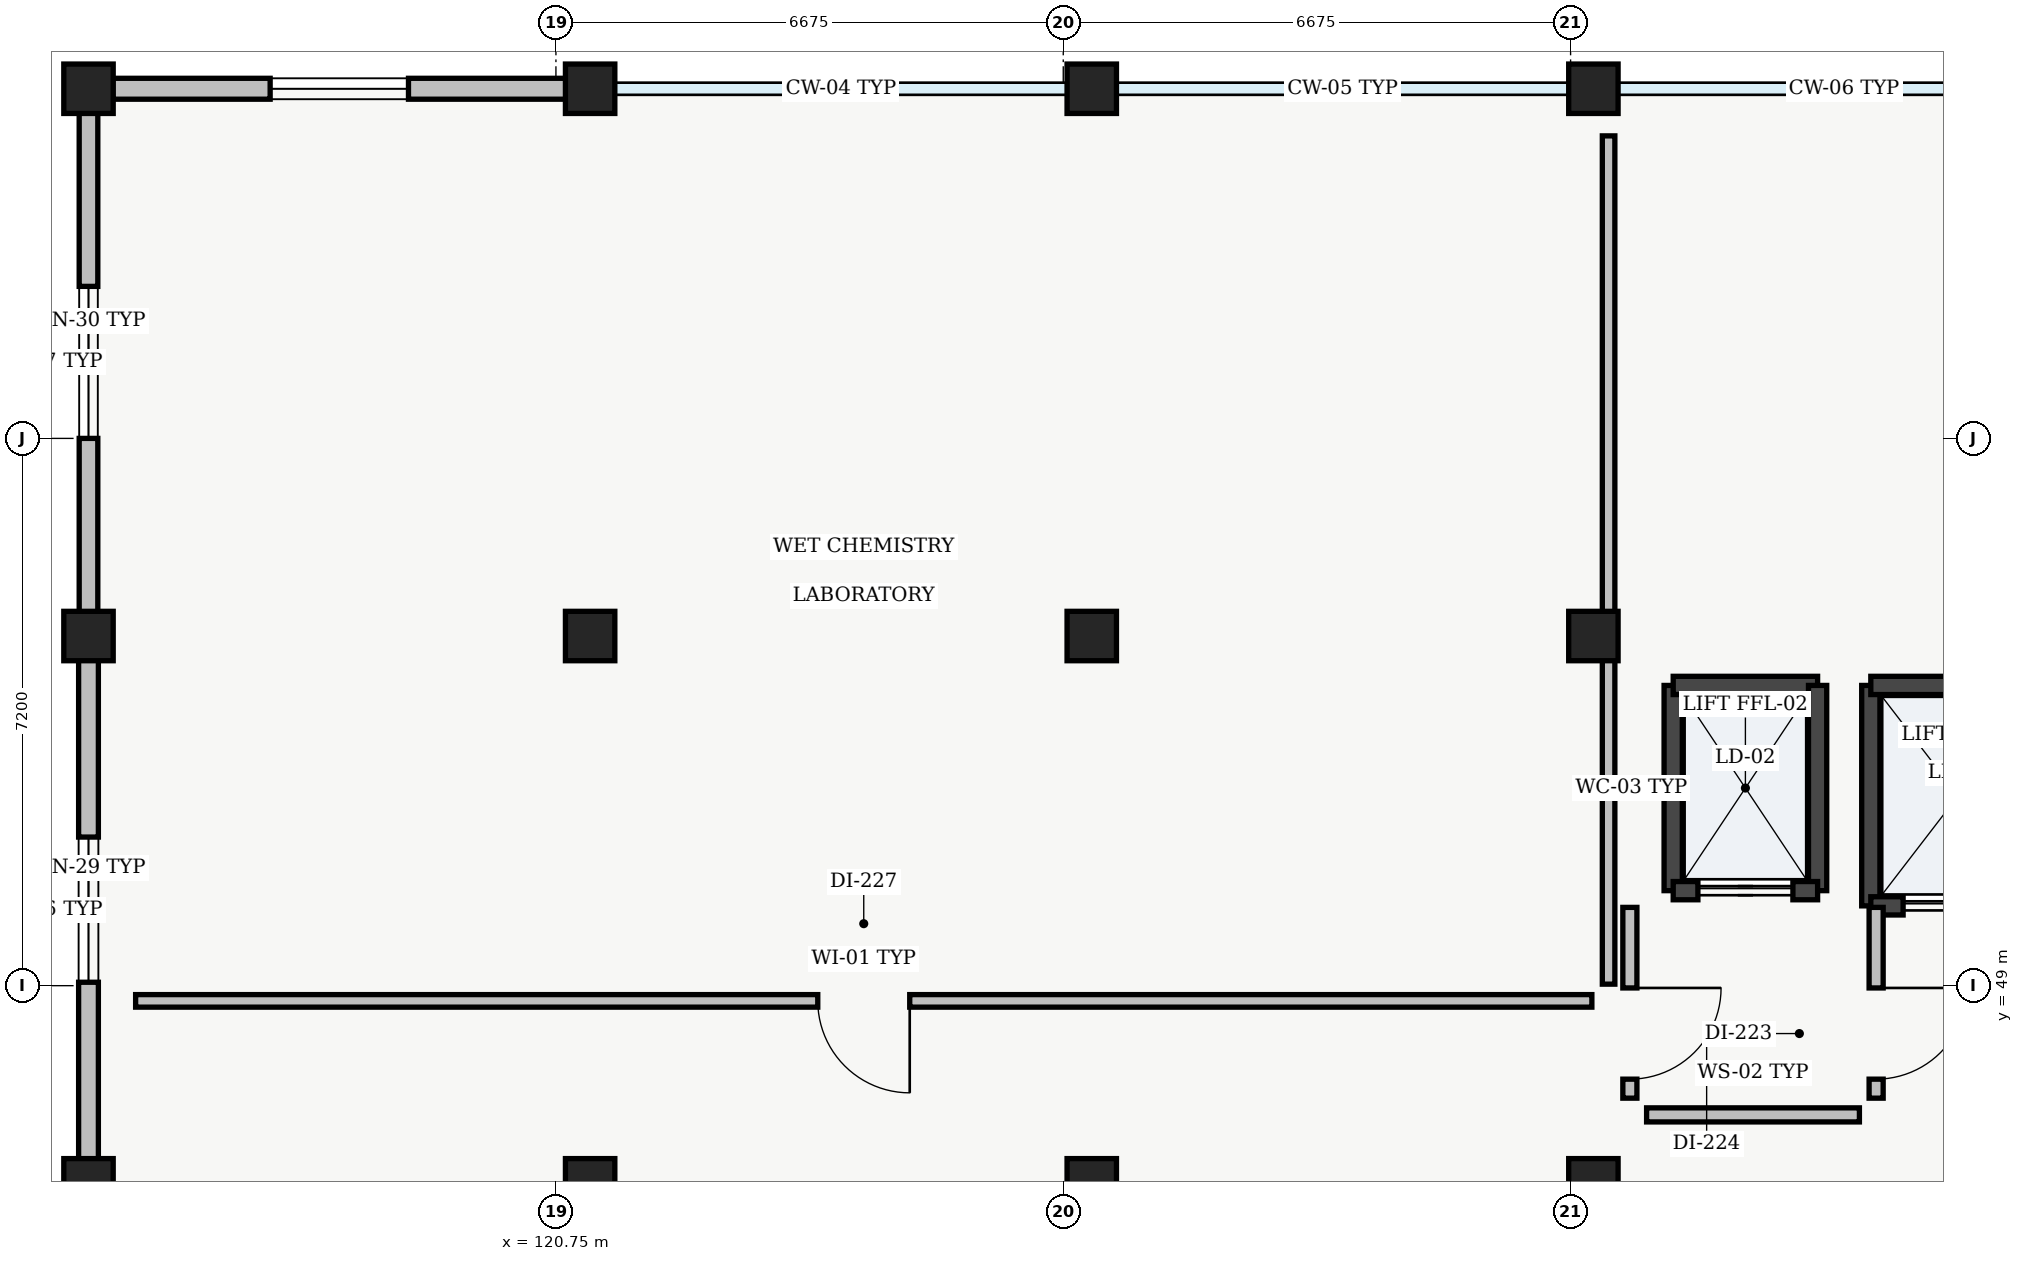
"""IFC4 building model, lengths in metres.
Left out: names, types, materials, properties, quantities, classifications, styles, units other than length and angle.
Written with IfcOpenShell. Run it as: python <this file> out.ifc"""

import sys

from ifc_helpers import new_model, si_unit, direction, frame, frame_2d, origin, origin_2d, place, context, subcontext, project, spatial, rectangle, extrude, element, fill, save


model = new_model("IFC4")
c1 = context("Model", 3, precision=1e-05, world=origin(), true_north=direction((0.0, 1.0)))
c2 = subcontext(c1, "Body", "Model", "MODEL_VIEW")
j1 = project(units=[si_unit("LENGTHUNIT", "METRE"), si_unit("PLANEANGLEUNIT", "RADIAN")], contexts=[c1])
p1 = place(None, origin())
s1 = spatial("IfcSite", under=j1, at=p1, CompositionType="ELEMENT")
p2 = place(p1, origin())
s2 = spatial("IfcBuilding", under=s1, at=p2, CompositionType="ELEMENT")
p3 = place(p2, frame((0.0, 0.0, 18.6)))
s3 = spatial("IfcBuildingStorey", under=s2, at=p3, CompositionType="ELEMENT", Elevation=18.6)
for number, where, z_axis, x_axis in (
    (1, (114.6, 46.4, 0.0), (0.0, 0.0, 1.0), (1.0, 0.0, 0.0)),
    (2, (114.6, 53.6, 0.0), (0.0, 0.0, 1.0), (1.0, 0.0, 0.0)),
    (3, (114.6, 60.8, 0.0), (0.0, 0.0, 1.0), (1.0, 0.0, 0.0)),
    (4, (121.2, 46.4, 0.0), (0.0, 0.0, 1.0), (1.0, 0.0, 0.0)),
    (5, (121.2, 53.6, 0.0), (0.0, 0.0, 1.0), (1.0, 0.0, 0.0)),
    (6, (121.2, 60.8, 0.0), (0.0, 0.0, 1.0), (1.0, 0.0, 0.0)),
    (7, (127.8, 46.4, 0.0), (0.0, 0.0, 1.0), (1.0, 0.0, 0.0)),
    (8, (127.8, 53.6, 0.0), (0.0, 0.0, 1.0), (1.0, 0.0, 0.0)),
    (9, (127.8, 60.8, 0.0), (0.0, 0.0, 1.0), (1.0, 0.0, 0.0)),
    (10, (134.4, 46.4, 0.0), (0.0, 0.0, 1.0), (1.0, 0.0, 0.0)),
    (11, (134.4, 53.6, 0.0), (0.0, 0.0, 1.0), (1.0, 0.0, 0.0)),
    (12, (134.4, 60.8, 0.0), (0.0, 0.0, 1.0), (1.0, 0.0, 0.0)),
):
    element("IfcColumn", number, at=place(p3, frame(where, z_axis=z_axis, x_axis=x_axis)), inside=s3, PredefinedType="COLUMN", context=c2, shape_type="SweptSolid", body=[
        extrude(rectangle(XDim=0.65, YDim=0.65, at=origin_2d()), origin(), (0.0, 0.0, 1.0), 4.3),
    ])
p4 = place(p3, frame((114.6, 46.72, 0.0), z_axis=(0.0, 0.0, 1.0), x_axis=(0.0, 1.0, 0.0)))
e13 = element("IfcWall", 13, at=p4, inside=s3, PredefinedType="STANDARD", context=c2, shape_type="SweptSolid", body=[
    extrude(rectangle(XDim=6.56, YDim=0.26, at=frame_2d((3.28, 0.0))), origin(), (0.0, 0.0, 1.0), 3.835),
])
p5 = place(p4, frame((2.325, 0.0, 0.95)))
e14 = element("IfcOpeningElement", 14, at=p5, cuts=e13, PredefinedType="OPENING", context=c2, shape_type="SweptSolid", body=[
    extrude(rectangle(XDim=1.91, YDim=1.4, at=frame_2d((0.955, 0.7))), frame((0.0, 0.13, 0.0), z_axis=(0.0, -1.0, 0.0), x_axis=(1.0, 0.0, 0.0)), (0.0, 0.0, 1.0), 0.26),
])
p6 = place(p3, frame((114.6, 53.92, 0.0), z_axis=(0.0, 0.0, 1.0), x_axis=(0.0, 1.0, 0.0)))
e15 = element("IfcWall", 15, at=p6, inside=s3, PredefinedType="STANDARD", context=c2, shape_type="SweptSolid", body=[
    extrude(rectangle(XDim=6.56, YDim=0.245, at=frame_2d((3.28, 0.0))), origin(), (0.0, 0.0, 1.0), 3.835),
])
p7 = place(p6, frame((2.28, 0.0, 0.95)))
e16 = element("IfcOpeningElement", 16, at=p7, cuts=e15, PredefinedType="OPENING", context=c2, shape_type="SweptSolid", body=[
    extrude(rectangle(XDim=2.0, YDim=1.42, at=frame_2d((1.0, 0.71))), frame((0.0, 0.123, 0.0), z_axis=(0.0, -1.0, 0.0), x_axis=(1.0, 0.0, 0.0)), (0.0, 0.0, 1.0), 0.245),
])
p8 = place(p3, frame((114.92, 60.8, 0.0), z_axis=(0.0, 0.0, 1.0), x_axis=(1.0, 0.0, 0.0)))
e17 = element("IfcWall", 17, at=p8, inside=s3, PredefinedType="STANDARD", context=c2, shape_type="SweptSolid", body=[
    extrude(rectangle(XDim=5.96, YDim=0.275, at=frame_2d((2.98, 0.0))), origin(), (0.0, 0.0, 1.0), 3.835),
])
p9 = place(p8, frame((2.07, 0.0, 0.95)))
e18 = element("IfcOpeningElement", 18, at=p9, cuts=e17, PredefinedType="OPENING", context=c2, shape_type="SweptSolid", body=[
    extrude(rectangle(XDim=1.82, YDim=1.38, at=frame_2d((0.91, 0.69))), frame((0.0, 0.137, 0.0), z_axis=(0.0, -1.0, 0.0), x_axis=(1.0, 0.0, 0.0)), (0.0, 0.0, 1.0), 0.275),
])
p10 = place(p3, frame((135.45, 50.25, 0.0), z_axis=(0.0, 0.0, 1.0), x_axis=(0.0, 1.0, 0.0)))
e19 = element("IfcWall", 19, at=p10, inside=s3, PredefinedType="SHEAR", context=c2, shape_type="SweptSolid", body=[
    extrude(rectangle(XDim=2.7, YDim=0.24, at=frame_2d((1.35, 0.0))), origin(), (0.0, 0.0, 1.0), 4.28),
])
p11 = place(p3, frame((135.45, 52.95, 0.0), z_axis=(0.0, 0.0, 1.0), x_axis=(1.0, 0.0, 0.0)))
e20 = element("IfcWall", 20, at=p11, inside=s3, PredefinedType="SHEAR", context=c2, shape_type="SweptSolid", body=[
    extrude(rectangle(XDim=1.9, YDim=0.24, at=frame_2d((0.95, 0.0))), origin(), (0.0, 0.0, 1.0), 4.28),
])
p12 = place(p3, frame((137.35, 52.95, 0.0), z_axis=(0.0, 0.0, 1.0), x_axis=(0.0, -1.0, 0.0)))
e21 = element("IfcWall", 21, at=p12, inside=s3, PredefinedType="SHEAR", context=c2, shape_type="SweptSolid", body=[
    extrude(rectangle(XDim=2.7, YDim=0.24, at=frame_2d((1.35, 0.0))), origin(), (0.0, 0.0, 1.0), 4.28),
])
p13 = place(p3, frame((137.35, 50.25, 0.0), z_axis=(0.0, 0.0, 1.0), x_axis=(-1.0, 0.0, 0.0)))
e22 = element("IfcWall", 22, at=p13, inside=s3, PredefinedType="SHEAR", context=c2, shape_type="SweptSolid", body=[
    extrude(rectangle(XDim=1.9, YDim=0.24, at=frame_2d((0.95, 0.0))), origin(), (0.0, 0.0, 1.0), 4.28),
])
p14 = place(p13, frame((0.325, 0.0, 0.0)))
e23 = element("IfcOpeningElement", 23, at=p14, cuts=e22, PredefinedType="OPENING", context=c2, shape_type="SweptSolid", body=[
    extrude(rectangle(XDim=1.25, YDim=2.2, at=frame_2d((0.625, 1.1))), frame((0.0, 0.12, 0.0), z_axis=(0.0, -1.0, 0.0), x_axis=(1.0, 0.0, 0.0)), (0.0, 0.0, 1.0), 0.24),
])
p15 = place(p3, frame((138.05, 50.05, 0.0), z_axis=(0.0, 0.0, 1.0), x_axis=(0.0, 1.0, 0.0)))
e24 = element("IfcWall", 24, at=p15, inside=s3, PredefinedType="SHEAR", context=c2, shape_type="SweptSolid", body=[
    extrude(rectangle(XDim=2.9, YDim=0.24, at=frame_2d((1.45, 0.0))), origin(), (0.0, 0.0, 1.0), 4.28),
])
p16 = place(p3, frame((138.05, 52.95, 0.0), z_axis=(0.0, 0.0, 1.0), x_axis=(1.0, 0.0, 0.0)))
e25 = element("IfcWall", 25, at=p16, inside=s3, PredefinedType="SHEAR", context=c2, shape_type="SweptSolid", body=[
    extrude(rectangle(XDim=2.3, YDim=0.24, at=frame_2d((1.15, 0.0))), origin(), (0.0, 0.0, 1.0), 4.28),
])
p17 = place(p3, frame((140.35, 50.05, 0.0), z_axis=(0.0, 0.0, 1.0), x_axis=(-1.0, 0.0, 0.0)))
e26 = element("IfcWall", 26, at=p17, inside=s3, PredefinedType="SHEAR", context=c2, shape_type="SweptSolid", body=[
    extrude(rectangle(XDim=2.3, YDim=0.24, at=frame_2d((1.15, 0.0))), origin(), (0.0, 0.0, 1.0), 4.28),
])
p18 = place(p17, frame((0.425, 0.0, 0.0)))
e27 = element("IfcOpeningElement", 27, at=p18, cuts=e26, PredefinedType="OPENING", context=c2, shape_type="SweptSolid", body=[
    extrude(rectangle(XDim=1.45, YDim=2.3, at=frame_2d((0.725, 1.15))), frame((0.0, 0.12, 0.0), z_axis=(0.0, -1.0, 0.0), x_axis=(1.0, 0.0, 0.0)), (0.0, 0.0, 1.0), 0.24),
])
p19 = place(p3, frame((135.1, 47.3, 0.0), z_axis=(0.0, 0.0, 1.0), x_axis=(1.0, 0.0, 0.0)))
e28 = element("IfcWall", 28, at=p19, inside=s3, PredefinedType="SOLIDWALL", context=c2, shape_type="SweptSolid", body=[
    extrude(rectangle(XDim=2.8, YDim=0.185, at=frame_2d((1.4, 0.0))), origin(), (0.0, 0.0, 1.0), 3.95),
])
p20 = place(p3, frame((138.12, 47.52, 0.0), z_axis=(0.0, 0.0, 1.0), x_axis=(0.0, 1.0, 0.0)))
e29 = element("IfcWall", 29, at=p20, inside=s3, PredefinedType="SOLIDWALL", context=c2, shape_type="SweptSolid", body=[
    extrude(rectangle(XDim=2.51, YDim=0.185, at=frame_2d((1.255, 0.0))), origin(), (0.0, 0.0, 1.0), 3.95),
])
p21 = place(p20, frame((0.25, 0.0, 0.0)))
e30 = element("IfcOpeningElement", 30, at=p21, cuts=e29, PredefinedType="OPENING", context=c2, shape_type="SweptSolid", body=[
    extrude(rectangle(XDim=1.2, YDim=2.15, at=frame_2d((0.6, 1.075))), frame((0.0, 0.093, 0.0), z_axis=(0.0, -1.0, 0.0), x_axis=(1.0, 0.0, 0.0)), (0.0, 0.0, 1.0), 0.185),
])
p22 = place(p3, frame((134.88, 50.03, 0.0), z_axis=(0.0, 0.0, 1.0), x_axis=(0.0, -1.0, 0.0)))
e31 = element("IfcWall", 31, at=p22, inside=s3, PredefinedType="SOLIDWALL", context=c2, shape_type="SweptSolid", body=[
    extrude(rectangle(XDim=2.51, YDim=0.185, at=frame_2d((1.255, 0.0))), origin(), (0.0, 0.0, 1.0), 3.95),
])
p23 = place(p22, frame((1.06, 0.0, 0.0)))
e32 = element("IfcOpeningElement", 32, at=p23, cuts=e31, PredefinedType="OPENING", context=c2, shape_type="SweptSolid", body=[
    extrude(rectangle(XDim=1.2, YDim=2.15, at=frame_2d((0.6, 1.075))), frame((0.0, 0.093, 0.0), z_axis=(0.0, -1.0, 0.0), x_axis=(1.0, 0.0, 0.0)), (0.0, 0.0, 1.0), 0.185),
])
p24 = place(p3, frame((115.22, 48.8, 0.0), z_axis=(0.0, 0.0, 1.0), x_axis=(1.0, 0.0, 0.0)))
e33 = element("IfcWall", 33, at=p24, inside=s3, PredefinedType="PARTITIONING", context=c2, shape_type="SweptSolid", body=[
    extrude(rectangle(XDim=19.16, YDim=0.165, at=frame_2d((9.58, 0.0))), origin(), (0.0, 0.0, 1.0), 3.885),
])
p25 = place(p24, frame((8.975, 0.0, 0.0)))
e34 = element("IfcOpeningElement", 34, at=p25, cuts=e33, PredefinedType="OPENING", context=c2, shape_type="SweptSolid", body=[
    extrude(rectangle(XDim=1.21, YDim=2.16, at=frame_2d((0.605, 1.08))), frame((0.0, 0.083, 0.0), z_axis=(0.0, -1.0, 0.0), x_axis=(1.0, 0.0, 0.0)), (0.0, 0.0, 1.0), 0.165),
])
p26 = place(p3, frame((134.6, 49.02, 0.0), z_axis=(0.0, 0.0, 1.0), x_axis=(0.0, 1.0, 0.0)))
e35 = element("IfcWall", 35, at=p26, inside=s3, PredefinedType="PARTITIONING", context=c2, shape_type="SweptSolid", body=[
    extrude(rectangle(XDim=11.16, YDim=0.165, at=frame_2d((5.58, 0.0))), origin(), (0.0, 0.0, 1.0), 3.685),
])
p27 = place(p5, origin())
e36 = element("IfcWindow", 36, at=p27, inside=s3, PartitioningType="SINGLE_PANEL", PredefinedType="WINDOW", context=c2, shape_type="SweptSolid", body=[
    extrude(rectangle(XDim=1.91, YDim=1.4, at=frame_2d((0.955, 0.7))), frame((0.0, 0.03, 0.0), z_axis=(0.0, -1.0, 0.0), x_axis=(1.0, 0.0, 0.0)), (0.0, 0.0, 1.0), 0.06),
])
fill(e14, e36)
p28 = place(p7, origin())
e37 = element("IfcWindow", 37, at=p28, inside=s3, PartitioningType="SINGLE_PANEL", PredefinedType="WINDOW", context=c2, shape_type="SweptSolid", body=[
    extrude(rectangle(XDim=2.0, YDim=1.42, at=frame_2d((1.0, 0.71))), frame((0.0, 0.03, 0.0), z_axis=(0.0, -1.0, 0.0), x_axis=(1.0, 0.0, 0.0)), (0.0, 0.0, 1.0), 0.06),
])
fill(e16, e37)
p29 = place(p9, origin())
e38 = element("IfcWindow", 38, at=p29, inside=s3, PartitioningType="SINGLE_PANEL", PredefinedType="WINDOW", context=c2, shape_type="SweptSolid", body=[
    extrude(rectangle(XDim=1.82, YDim=1.38, at=frame_2d((0.91, 0.69))), frame((0.0, 0.03, 0.0), z_axis=(0.0, -1.0, 0.0), x_axis=(1.0, 0.0, 0.0)), (0.0, 0.0, 1.0), 0.06),
])
fill(e18, e38)
p30 = place(p14, origin())
e39 = element("IfcDoor", 39, at=p30, inside=s3, OperationType="SLIDING_TO_RIGHT", PredefinedType="DOOR", context=c2, shape_type="SweptSolid", body=[
    extrude(rectangle(XDim=1.25, YDim=2.2, at=frame_2d((0.625, 1.1))), frame((0.0, 0.025, 0.0), z_axis=(0.0, -1.0, 0.0), x_axis=(1.0, 0.0, 0.0)), (0.0, 0.0, 1.0), 0.05),
])
fill(e23, e39)
p31 = place(p18, origin())
e40 = element("IfcDoor", 40, at=p31, inside=s3, OperationType="DOUBLE_DOOR_SLIDING", PredefinedType="DOOR", context=c2, shape_type="SweptSolid", body=[
    extrude(rectangle(XDim=1.45, YDim=2.3, at=frame_2d((0.725, 1.15))), frame((0.0, 0.025, 0.0), z_axis=(0.0, -1.0, 0.0), x_axis=(1.0, 0.0, 0.0)), (0.0, 0.0, 1.0), 0.05),
])
fill(e27, e40)
p32 = place(p21, origin())
e41 = element("IfcDoor", 41, at=p32, inside=s3, OperationType="SINGLE_SWING_RIGHT", PredefinedType="DOOR", context=c2, shape_type="SweptSolid", body=[
    extrude(rectangle(XDim=1.2, YDim=2.15, at=frame_2d((0.6, 1.075))), frame((0.0, 0.025, 0.0), z_axis=(0.0, -1.0, 0.0), x_axis=(1.0, 0.0, 0.0)), (0.0, 0.0, 1.0), 0.05),
])
fill(e30, e41)
p33 = place(p23, origin())
e42 = element("IfcDoor", 42, at=p33, inside=s3, OperationType="SINGLE_SWING_LEFT", PredefinedType="DOOR", context=c2, shape_type="SweptSolid", body=[
    extrude(rectangle(XDim=1.2, YDim=2.15, at=frame_2d((0.6, 1.075))), frame((0.0, 0.025, 0.0), z_axis=(0.0, -1.0, 0.0), x_axis=(1.0, 0.0, 0.0)), (0.0, 0.0, 1.0), 0.05),
])
fill(e32, e42)
p34 = place(p25, origin())
e43 = element("IfcDoor", 43, at=p34, inside=s3, OperationType="SINGLE_SWING_RIGHT", PredefinedType="DOOR", context=c2, shape_type="SweptSolid", body=[
    extrude(rectangle(XDim=1.21, YDim=2.16, at=frame_2d((0.605, 1.08))), frame((0.0, 0.025, 0.0), z_axis=(0.0, -1.0, 0.0), x_axis=(1.0, 0.0, 0.0)), (0.0, 0.0, 1.0), 0.05),
])
fill(e34, e43)
save(model, sys.argv[1])
